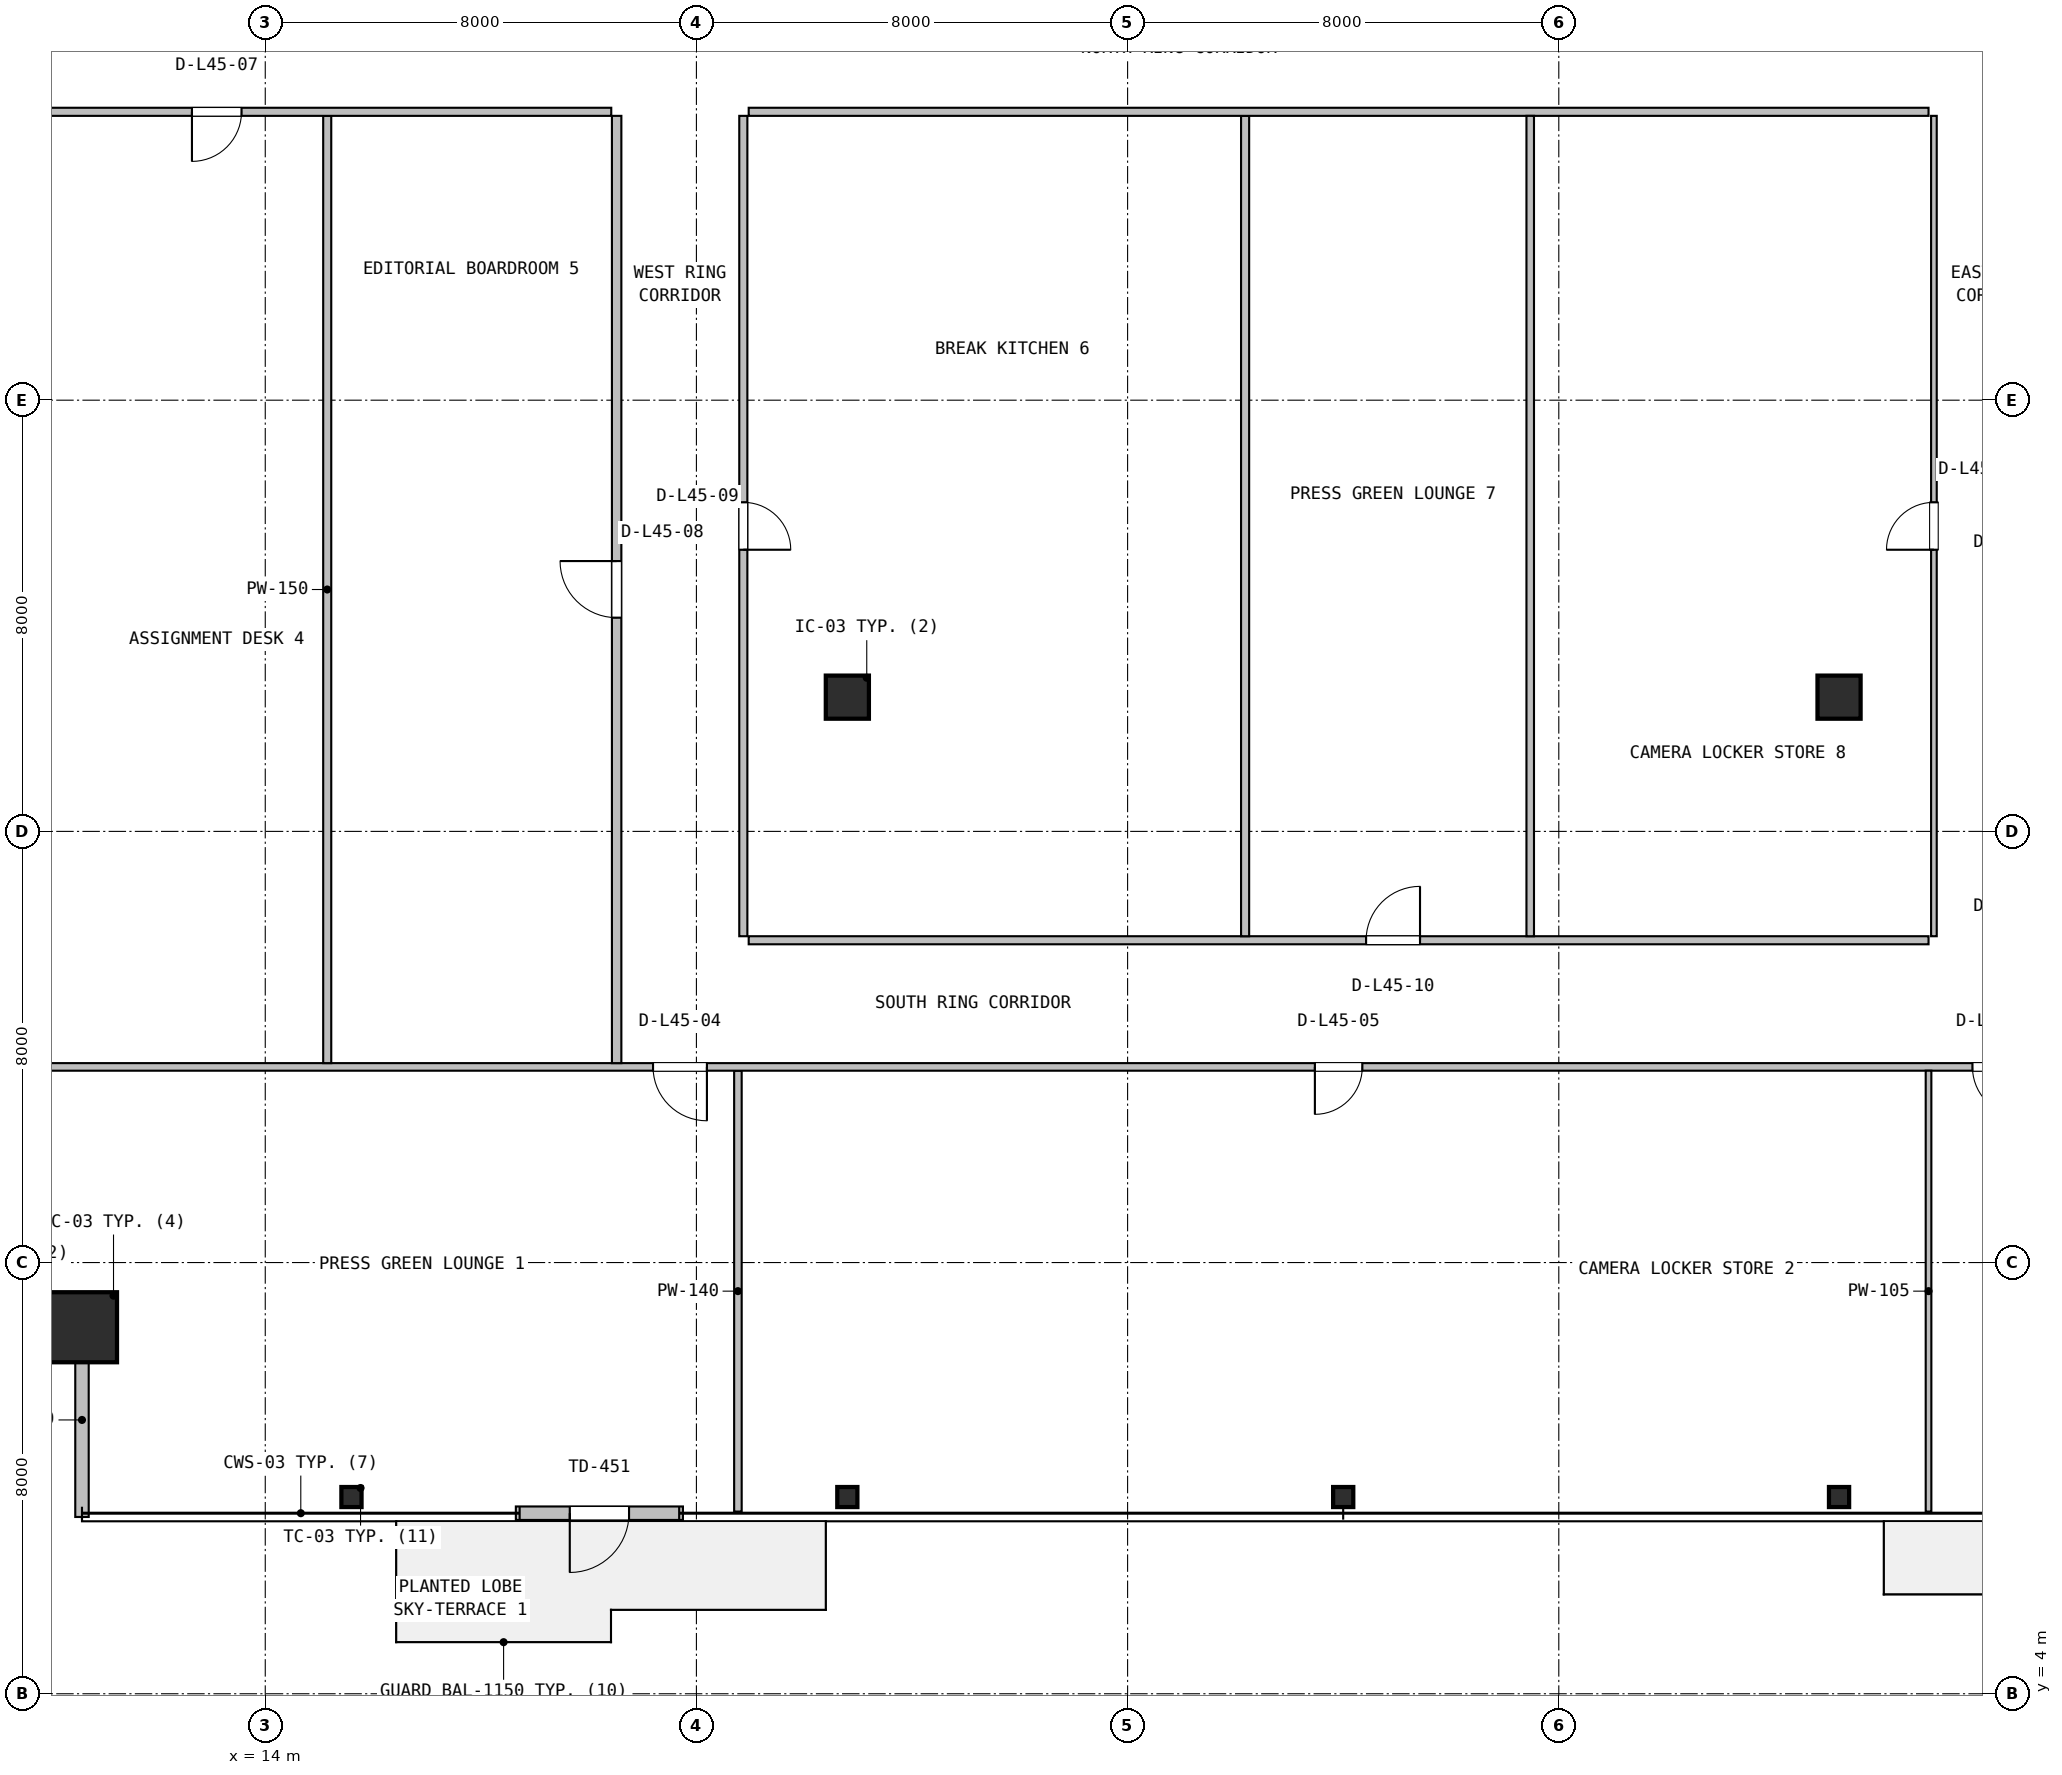
"""IFC4 building model, lengths in metres.
Left out: names, types, materials, properties, quantities, classifications, styles, units other than length and angle.
Written with IfcOpenShell. Run it as: python <this file> out.ifc"""

import sys

from ifc_helpers import new_model, si_unit, direction, frame, frame_2d, origin, origin_2d, place, context, subcontext, project, spatial, rectangle, hollow_rectangle, i_section, extrude, source, transform, mapped, element, fill, save


model = new_model("IFC4")
c1 = context("Model", 3, precision=1e-05, world=origin(), true_north=direction((0.0, 1.0)))
c2 = subcontext(c1, "Body", "Model", "MODEL_VIEW")
j1 = project(units=[si_unit("LENGTHUNIT", "METRE"), si_unit("PLANEANGLEUNIT", "RADIAN")], contexts=[c1])
p1 = place(None, origin())
s1 = spatial("IfcSite", under=j1, at=p1, CompositionType="ELEMENT")
p2 = place(p1, origin())
s2 = spatial("IfcBuilding", under=s1, at=p2, CompositionType="ELEMENT")
p3 = place(p2, frame((0.0, 0.0, 183.8)))
s3 = spatial("IfcBuildingStorey", under=s2, at=p3, CompositionType="ELEMENT", Elevation=183.8)
m1 = source(origin(), c2, "Body", "SweptSolid", [
    extrude(hollow_rectangle(XDim=1.3, YDim=1.3, WallThickness=0.05, at=origin_2d()), origin(), (0.0, 0.0, 1.0), 3.8),
])
p4 = place(p3, frame((10.6, 10.8, 0.0), z_axis=(0.0, 0.0, 1.0), x_axis=(1.0, 0.0, 0.0)))
e1 = element("IfcColumn", 1, at=p4, inside=s3, PredefinedType="COLUMN", context=c2, shape_type="MappedRepresentation", body=[
    mapped(m1, transform((0.0, 0.0, 0.0), x_axis=(1.0, 0.0, 0.0), y_axis=(0.0, 1.0, 0.0), z_axis=(0.0, 0.0, 1.0), scale=1.0)),
])
m2 = source(origin(), c2, "Body", "SweptSolid", [
    extrude(i_section(OverallWidth=0.374, OverallDepth=0.372, WebThickness=0.016, FlangeThickness=0.026, FilletRadius=0.016, at=origin_2d()), origin(), (0.0, 0.0, 1.0), 3.8),
])
for number, where, z_axis, x_axis in (
    (2, (15.6, 7.65, 0.0), (0.0, 0.0, 1.0), (1.0, 0.0, 0.0)),
    (3, (24.8, 7.65, 0.0), (0.0, 0.0, 1.0), (1.0, 0.0, 0.0)),
    (4, (34.0, 7.65, 0.0), (0.0, 0.0, 1.0), (1.0, 0.0, 0.0)),
    (5, (43.2, 7.65, 0.0), (0.0, 0.0, 1.0), (1.0, 0.0, 0.0)),
):
    element("IfcColumn", number, at=place(p3, frame(where, z_axis=z_axis, x_axis=x_axis)), inside=s3, PredefinedType="COLUMN", context=c2, shape_type="MappedRepresentation", body=[
        mapped(m2, transform((0.0, 0.0, 0.0), x_axis=(1.0, 0.0, 0.0), y_axis=(0.0, 1.0, 0.0), z_axis=(0.0, 0.0, 1.0), scale=1.0)),
    ])
m3 = source(origin(), c2, "Body", "SweptSolid", [
    extrude(rectangle(XDim=0.8, YDim=0.8, at=origin_2d()), origin(), (0.0, 0.0, 1.0), 3.8),
])
for number, where, z_axis, x_axis in (
    (6, (24.8, 22.49, 0.0), (0.0, 0.0, 1.0), (1.0, 0.0, 0.0)),
    (7, (43.2, 22.49, 0.0), (0.0, 0.0, 1.0), (1.0, 0.0, 0.0)),
):
    element("IfcColumn", number, at=place(p3, frame(where, z_axis=z_axis, x_axis=x_axis)), inside=s3, PredefinedType="COLUMN", context=c2, shape_type="MappedRepresentation", body=[
        mapped(m3, transform((0.0, 0.0, 0.0), x_axis=(1.0, 0.0, 0.0), y_axis=(0.0, 1.0, 0.0), z_axis=(0.0, 0.0, 1.0), scale=1.0)),
    ])
p5 = place(p3, frame((18.65, 7.35, 0.0), z_axis=(0.0, 0.0, 1.0), x_axis=(1.0, 0.0, 0.0)))
e8 = element("IfcWall", 8, at=p5, inside=s3, PredefinedType="SOLIDWALL", context=c2, shape_type="SweptSolid", body=[
    extrude(rectangle(XDim=3.1, YDim=0.25, at=frame_2d((1.55, 0.0))), origin(), (0.0, 0.0, 1.0), 3.53),
])
p6 = place(p5, frame((1.0, 0.0, 0.0)))
e9 = element("IfcOpeningElement", 9, at=p6, cuts=e8, PredefinedType="OPENING", context=c2, shape_type="SweptSolid", body=[
    extrude(rectangle(XDim=1.1, YDim=2.15, at=frame_2d((0.55, 1.075))), frame((0.0, 0.135, 0.0), z_axis=(0.0, -1.0, 0.0), x_axis=(1.0, 0.0, 0.0)), (0.0, 0.0, 1.0), 0.27),
])
p7 = place(p3, frame((10.6, 7.28, 0.0), z_axis=(0.0, 0.0, 1.0), x_axis=(0.0, 1.0, 0.0)))
e10 = element("IfcWall", 10, at=p7, inside=s3, PredefinedType="SOLIDWALL", context=c2, shape_type="SweptSolid", body=[
    extrude(rectangle(XDim=3.6, YDim=0.25, at=frame_2d((1.8, 0.0))), origin(), (0.0, 0.0, 1.0), 3.108),
])
p8 = place(p3, frame((22.77, 7.38, 0.0), z_axis=(0.0, 0.0, 1.0), x_axis=(0.0, 1.0, 0.0)))
e11 = element("IfcWall", 11, at=p8, inside=s3, PredefinedType="PARTITIONING", context=c2, shape_type="SweptSolid", body=[
    extrude(rectangle(XDim=8.18, YDim=0.14, at=frame_2d((4.09, 0.0))), origin(), (0.0, 0.0, 1.0), 3.108),
])
p9 = place(p3, frame((7.18, 15.63, 0.0), z_axis=(0.0, 0.0, 1.0), x_axis=(1.0, 0.0, 0.0)))
e12 = element("IfcWall", 12, at=p9, inside=s3, PredefinedType="PARTITIONING", context=c2, shape_type="SweptSolid", body=[
    extrude(rectangle(XDim=53.64, YDim=0.14, at=frame_2d((26.82, 0.0))), origin(), (0.0, 0.0, 1.0), 2.909),
])
p10 = place(p9, frame((14.015, 0.0, 0.0)))
e13 = element("IfcOpeningElement", 13, at=p10, cuts=e12, PredefinedType="OPENING", context=c2, shape_type="SweptSolid", body=[
    extrude(rectangle(XDim=1.0, YDim=2.1, at=frame_2d((0.5, 1.05))), frame((0.0, 0.08, 0.0), z_axis=(0.0, -1.0, 0.0), x_axis=(1.0, 0.0, 0.0)), (0.0, 0.0, 1.0), 0.16),
])
p11 = place(p9, frame((26.295, 0.0, 0.0)))
e14 = element("IfcOpeningElement", 14, at=p11, cuts=e12, PredefinedType="OPENING", context=c2, shape_type="SweptSolid", body=[
    extrude(rectangle(XDim=0.88, YDim=2.06, at=frame_2d((0.44, 1.03))), frame((0.0, 0.08, 0.0), z_axis=(0.0, -1.0, 0.0), x_axis=(1.0, 0.0, 0.0)), (0.0, 0.0, 1.0), 0.16),
])
p12 = place(p9, frame((38.495, 0.0, 0.0)))
e15 = element("IfcOpeningElement", 15, at=p12, cuts=e12, PredefinedType="OPENING", context=c2, shape_type="SweptSolid", body=[
    extrude(rectangle(XDim=0.92, YDim=2.08, at=frame_2d((0.46, 1.04))), frame((0.0, 0.08, 0.0), z_axis=(0.0, -1.0, 0.0), x_axis=(1.0, 0.0, 0.0)), (0.0, 0.0, 1.0), 0.16),
])
p13 = place(p3, frame((44.86, 7.38, 0.0), z_axis=(0.0, 0.0, 1.0), x_axis=(0.0, 1.0, 0.0)))
e16 = element("IfcWall", 16, at=p13, inside=s3, PredefinedType="PARTITIONING", context=c2, shape_type="SweptSolid", body=[
    extrude(rectangle(XDim=8.18, YDim=0.105, at=frame_2d((4.09, 0.0))), origin(), (0.0, 0.0, 1.0), 3.108),
])
p14 = place(p3, frame((15.15, 15.7, 0.0), z_axis=(0.0, 0.0, 1.0), x_axis=(0.0, 1.0, 0.0)))
e17 = element("IfcWall", 17, at=p14, inside=s3, PredefinedType="PARTITIONING", context=c2, shape_type="SweptSolid", body=[
    extrude(rectangle(XDim=17.575, YDim=0.15, at=frame_2d((8.788, 0.0))), origin(), (0.0, 0.0, 1.0), 3.222),
])
p15 = place(p3, frame((7.18, 33.35, 0.0), z_axis=(0.0, 0.0, 1.0), x_axis=(1.0, 0.0, 0.0)))
e18 = element("IfcWall", 18, at=p15, inside=s3, PredefinedType="PARTITIONING", context=c2, shape_type="SweptSolid", body=[
    extrude(rectangle(XDim=13.24, YDim=0.15, at=frame_2d((6.62, 0.0))), origin(), (0.0, 0.0, 1.0), 3.108),
])
p16 = place(p15, frame((5.46, 0.0, 0.0)))
e19 = element("IfcOpeningElement", 19, at=p16, cuts=e18, PredefinedType="OPENING", context=c2, shape_type="SweptSolid", body=[
    extrude(rectangle(XDim=0.92, YDim=2.08, at=frame_2d((0.46, 1.04))), frame((0.0, 0.085, 0.0), z_axis=(0.0, -1.0, 0.0), x_axis=(1.0, 0.0, 0.0)), (0.0, 0.0, 1.0), 0.17),
])
p17 = place(p3, frame((20.52, 15.7, 0.0), z_axis=(0.0, 0.0, 1.0), x_axis=(0.0, 1.0, 0.0)))
e20 = element("IfcWall", 20, at=p17, inside=s3, PredefinedType="PARTITIONING", context=c2, shape_type="SweptSolid", body=[
    extrude(rectangle(XDim=17.575, YDim=0.175, at=frame_2d((8.788, 0.0))), origin(), (0.0, 0.0, 1.0), 3.222),
])
p18 = place(p17, frame((8.265, 0.0, 0.0)))
e21 = element("IfcOpeningElement", 21, at=p18, cuts=e20, PredefinedType="OPENING", context=c2, shape_type="SweptSolid", body=[
    extrude(rectangle(XDim=1.05, YDim=2.1, at=frame_2d((0.525, 1.05))), frame((0.0, 0.098, 0.0), z_axis=(0.0, -1.0, 0.0), x_axis=(1.0, 0.0, 0.0)), (0.0, 0.0, 1.0), 0.195),
])
p19 = place(p3, frame((22.97, 17.98, 0.0), z_axis=(0.0, 0.0, 1.0), x_axis=(1.0, 0.0, 0.0)))
e22 = element("IfcWall", 22, at=p19, inside=s3, PredefinedType="PARTITIONING", context=c2, shape_type="SweptSolid", body=[
    extrude(rectangle(XDim=21.89, YDim=0.15, at=frame_2d((10.945, 0.0))), origin(), (0.0, 0.0, 1.0), 2.909),
])
p20 = place(p19, frame((11.455, 0.0, 0.0)))
e23 = element("IfcOpeningElement", 23, at=p20, cuts=e22, PredefinedType="OPENING", context=c2, shape_type="SweptSolid", body=[
    extrude(rectangle(XDim=1.0, YDim=2.1, at=frame_2d((0.5, 1.05))), frame((0.0, 0.085, 0.0), z_axis=(0.0, -1.0, 0.0), x_axis=(1.0, 0.0, 0.0)), (0.0, 0.0, 1.0), 0.17),
])
p21 = place(p3, frame((32.18, 18.055, 0.0), z_axis=(0.0, 0.0, 1.0), x_axis=(0.0, 1.0, 0.0)))
e24 = element("IfcWall", 24, at=p21, inside=s3, PredefinedType="PARTITIONING", context=c2, shape_type="SweptSolid", body=[
    extrude(rectangle(XDim=15.22, YDim=0.15, at=frame_2d((7.61, 0.0))), origin(), (0.0, 0.0, 1.0), 2.909),
])
p22 = place(p3, frame((22.97, 33.35, 0.0), z_axis=(0.0, 0.0, 1.0), x_axis=(1.0, 0.0, 0.0)))
e25 = element("IfcWall", 25, at=p22, inside=s3, PredefinedType="PARTITIONING", context=c2, shape_type="SweptSolid", body=[
    extrude(rectangle(XDim=21.89, YDim=0.15, at=frame_2d((10.945, 0.0))), origin(), (0.0, 0.0, 1.0), 2.909),
])
p23 = place(p3, frame((22.87, 18.055, 0.0), z_axis=(0.0, 0.0, 1.0), x_axis=(0.0, 1.0, 0.0)))
e26 = element("IfcWall", 26, at=p23, inside=s3, PredefinedType="PARTITIONING", context=c2, shape_type="SweptSolid", body=[
    extrude(rectangle(XDim=15.22, YDim=0.15, at=frame_2d((7.61, 0.0))), origin(), (0.0, 0.0, 1.0), 3.222),
])
p24 = place(p23, frame((7.17, 0.0, 0.0)))
e27 = element("IfcOpeningElement", 27, at=p24, cuts=e26, PredefinedType="OPENING", context=c2, shape_type="SweptSolid", body=[
    extrude(rectangle(XDim=0.88, YDim=2.06, at=frame_2d((0.44, 1.03))), frame((0.0, 0.085, 0.0), z_axis=(0.0, -1.0, 0.0), x_axis=(1.0, 0.0, 0.0)), (0.0, 0.0, 1.0), 0.17),
])
p25 = place(p3, frame((37.47, 18.055, 0.0), z_axis=(0.0, 0.0, 1.0), x_axis=(0.0, 1.0, 0.0)))
e28 = element("IfcWall", 28, at=p25, inside=s3, PredefinedType="PARTITIONING", context=c2, shape_type="SweptSolid", body=[
    extrude(rectangle(XDim=15.22, YDim=0.14, at=frame_2d((7.61, 0.0))), origin(), (0.0, 0.0, 1.0), 2.909),
])
p26 = place(p3, frame((44.96, 18.055, 0.0), z_axis=(0.0, 0.0, 1.0), x_axis=(0.0, 1.0, 0.0)))
e29 = element("IfcWall", 29, at=p26, inside=s3, PredefinedType="PARTITIONING", context=c2, shape_type="SweptSolid", body=[
    extrude(rectangle(XDim=15.22, YDim=0.105, at=frame_2d((7.61, 0.0))), origin(), (0.0, 0.0, 1.0), 3.222),
])
p27 = place(p26, frame((7.17, 0.0, 0.0)))
e30 = element("IfcOpeningElement", 30, at=p27, cuts=e29, PredefinedType="OPENING", context=c2, shape_type="SweptSolid", body=[
    extrude(rectangle(XDim=0.88, YDim=2.06, at=frame_2d((0.44, 1.03))), frame((0.0, 0.062, 0.0), z_axis=(0.0, -1.0, 0.0), x_axis=(1.0, 0.0, 0.0)), (0.0, 0.0, 1.0), 0.125),
])
m4 = source(origin(), c2, "Body", "SweptSolid", [
    extrude(rectangle(XDim=1.1, YDim=2.15, at=frame_2d((0.55, 1.075))), frame((0.0, 0.025, 0.0), z_axis=(0.0, -1.0, 0.0), x_axis=(1.0, 0.0, 0.0)), (0.0, 0.0, 1.0), 0.05),
])
p28 = place(p6, frame((1.1, 0.0, 0.0), z_axis=(0.0, 0.0, 1.0), x_axis=(-1.0, 0.0, 0.0)))
e31 = element("IfcDoor", 31, at=p28, inside=s3, OperationType="SINGLE_SWING_LEFT", PredefinedType="DOOR", context=c2, shape_type="MappedRepresentation", body=[
    mapped(m4, transform((0.0, 0.0, 0.0), x_axis=(1.0, 0.0, 0.0), y_axis=(0.0, 1.0, 0.0), z_axis=(0.0, 0.0, 1.0), scale=1.0)),
])
fill(e9, e31)
m5 = source(origin(), c2, "Body", "SweptSolid", [
    extrude(rectangle(XDim=1.0, YDim=2.1, at=frame_2d((0.5, 1.05))), frame((0.0, 0.025, 0.0), z_axis=(0.0, -1.0, 0.0), x_axis=(1.0, 0.0, 0.0)), (0.0, 0.0, 1.0), 0.05),
])
p29 = place(p10, frame((1.0, 0.0, 0.0), z_axis=(0.0, 0.0, 1.0), x_axis=(-1.0, 0.0, 0.0)))
e32 = element("IfcDoor", 32, at=p29, inside=s3, OperationType="SINGLE_SWING_RIGHT", PredefinedType="DOOR", context=c2, shape_type="MappedRepresentation", body=[
    mapped(m5, transform((0.0, 0.0, 0.0), x_axis=(1.0, 0.0, 0.0), y_axis=(0.0, 1.0, 0.0), z_axis=(0.0, 0.0, 1.0), scale=1.0)),
])
fill(e13, e32)
m6 = source(origin(), c2, "Body", "SweptSolid", [
    extrude(rectangle(XDim=0.88, YDim=2.06, at=frame_2d((0.44, 1.03))), frame((0.0, 0.025, 0.0), z_axis=(0.0, -1.0, 0.0), x_axis=(1.0, 0.0, 0.0)), (0.0, 0.0, 1.0), 0.05),
])
p30 = place(p11, frame((0.88, 0.0, 0.0), z_axis=(0.0, 0.0, 1.0), x_axis=(-1.0, 0.0, 0.0)))
e33 = element("IfcDoor", 33, at=p30, inside=s3, OperationType="SINGLE_SWING_LEFT", PredefinedType="DOOR", context=c2, shape_type="MappedRepresentation", body=[
    mapped(m6, transform((0.0, 0.0, 0.0), x_axis=(1.0, 0.0, 0.0), y_axis=(0.0, 1.0, 0.0), z_axis=(0.0, 0.0, 1.0), scale=1.0)),
])
fill(e14, e33)
m7 = source(origin(), c2, "Body", "SweptSolid", [
    extrude(rectangle(XDim=0.92, YDim=2.08, at=frame_2d((0.46, 1.04))), frame((0.0, 0.025, 0.0), z_axis=(0.0, -1.0, 0.0), x_axis=(1.0, 0.0, 0.0)), (0.0, 0.0, 1.0), 0.05),
])
p31 = place(p12, frame((0.92, 0.0, 0.0), z_axis=(0.0, 0.0, 1.0), x_axis=(-1.0, 0.0, 0.0)))
e34 = element("IfcDoor", 34, at=p31, inside=s3, OperationType="SINGLE_SWING_RIGHT", PredefinedType="DOOR", context=c2, shape_type="MappedRepresentation", body=[
    mapped(m7, transform((0.0, 0.0, 0.0), x_axis=(1.0, 0.0, 0.0), y_axis=(0.0, 1.0, 0.0), z_axis=(0.0, 0.0, 1.0), scale=1.0)),
])
fill(e15, e34)
p32 = place(p16, frame((0.92, 0.0, 0.0), z_axis=(0.0, 0.0, 1.0), x_axis=(-1.0, 0.0, 0.0)))
e35 = element("IfcDoor", 35, at=p32, inside=s3, OperationType="SINGLE_SWING_LEFT", PredefinedType="DOOR", context=c2, shape_type="MappedRepresentation", body=[
    mapped(m7, transform((0.0, 0.0, 0.0), x_axis=(1.0, 0.0, 0.0), y_axis=(0.0, 1.0, 0.0), z_axis=(0.0, 0.0, 1.0), scale=1.0)),
])
fill(e19, e35)
m8 = source(origin(), c2, "Body", "SweptSolid", [
    extrude(rectangle(XDim=1.05, YDim=2.1, at=frame_2d((0.525, 1.05))), frame((0.0, 0.025, 0.0), z_axis=(0.0, -1.0, 0.0), x_axis=(1.0, 0.0, 0.0)), (0.0, 0.0, 1.0), 0.05),
])
p33 = place(p18, origin())
e36 = element("IfcDoor", 36, at=p33, inside=s3, OperationType="SINGLE_SWING_RIGHT", PredefinedType="DOOR", context=c2, shape_type="MappedRepresentation", body=[
    mapped(m8, transform((0.0, 0.0, 0.0), x_axis=(1.0, 0.0, 0.0), y_axis=(0.0, 1.0, 0.0), z_axis=(0.0, 0.0, 1.0), scale=1.0)),
])
fill(e21, e36)
p34 = place(p24, frame((0.88, 0.0, 0.0), z_axis=(0.0, 0.0, 1.0), x_axis=(-1.0, 0.0, 0.0)))
e37 = element("IfcDoor", 37, at=p34, inside=s3, OperationType="SINGLE_SWING_LEFT", PredefinedType="DOOR", context=c2, shape_type="MappedRepresentation", body=[
    mapped(m6, transform((0.0, 0.0, 0.0), x_axis=(1.0, 0.0, 0.0), y_axis=(0.0, 1.0, 0.0), z_axis=(0.0, 0.0, 1.0), scale=1.0)),
])
fill(e27, e37)
p35 = place(p20, origin())
e38 = element("IfcDoor", 38, at=p35, inside=s3, OperationType="SINGLE_SWING_RIGHT", PredefinedType="DOOR", context=c2, shape_type="MappedRepresentation", body=[
    mapped(m5, transform((0.0, 0.0, 0.0), x_axis=(1.0, 0.0, 0.0), y_axis=(0.0, 1.0, 0.0), z_axis=(0.0, 0.0, 1.0), scale=1.0)),
])
fill(e23, e38)
p36 = place(p27, origin())
e39 = element("IfcDoor", 39, at=p36, inside=s3, OperationType="SINGLE_SWING_LEFT", PredefinedType="DOOR", context=c2, shape_type="MappedRepresentation", body=[
    mapped(m6, transform((0.0, 0.0, 0.0), x_axis=(1.0, 0.0, 0.0), y_axis=(0.0, 1.0, 0.0), z_axis=(0.0, 0.0, 1.0), scale=1.0)),
])
fill(e30, e39)
save(model, sys.argv[1])
